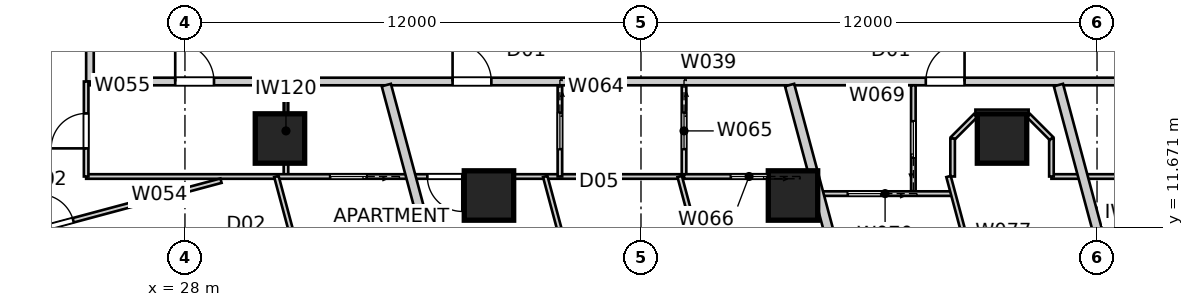
"""IFC4 building model, lengths in metres.
Left out: names, types, materials, properties, quantities, classifications, styles, units other than length and angle.
Written with IfcOpenShell. Run it as: python <this file> out.ifc"""

import sys

from ifc_helpers import new_model, si_unit, direction, frame, frame_2d, origin, origin_2d, place, context, subcontext, project, spatial, rectangle, extrude, element, fill, save


model = new_model("IFC4")
c1 = context("Model", 3, precision=1e-05, world=origin(), true_north=direction((0.0, 1.0)))
c2 = subcontext(c1, "Body", "Model", "MODEL_VIEW")
j1 = project(units=[si_unit("LENGTHUNIT", "METRE"), si_unit("PLANEANGLEUNIT", "RADIAN")], contexts=[c1])
p1 = place(None, origin())
s1 = spatial("IfcSite", under=j1, at=p1, CompositionType="ELEMENT")
p2 = place(p1, origin())
s2 = spatial("IfcBuilding", under=s1, at=p2, CompositionType="ELEMENT")
p3 = place(p2, frame((0.0, 0.0, 125.2)))
s3 = spatial("IfcBuildingStorey", under=s2, at=p3, CompositionType="ELEMENT", Elevation=125.2)
for number, where, z_axis, x_axis in (
    (1, (30.5, 14.0, 0.0), (0.0, 0.0, 1.0), (1.0, 0.0, 0.0)),
    (2, (36.0, 12.5, 0.0), (0.0, 0.0, 1.0), (1.0, 0.0, 0.0)),
    (3, (44.0, 12.5, 0.0), (0.0, 0.0, 1.0), (1.0, 0.0, 0.0)),
    (4, (49.5, 14.0, 0.0), (0.0, 0.0, 1.0), (1.0, 0.0, 0.0)),
):
    element("IfcColumn", number, at=place(p3, frame(where, z_axis=z_axis, x_axis=x_axis)), inside=s3, PredefinedType="COLUMN", context=c2, shape_type="SweptSolid", body=[
        extrude(rectangle(XDim=1.3, YDim=1.3, at=origin_2d()), origin(), (0.0, 0.0, 1.0), 3.4),
    ])
p4 = place(p3, frame((25.5, 15.5, 0.0), z_axis=(0.0, 0.0, 1.0), x_axis=(1.0, 0.0, 0.0)))
e5 = element("IfcWall", 5, at=p4, inside=s3, PredefinedType="PARTITIONING", context=c2, shape_type="SweptSolid", body=[
    extrude(rectangle(XDim=28.2, YDim=0.2, at=frame_2d((14.1, 0.0))), origin(), (0.0, 0.0, 1.0), 3.25),
])
p5 = place(p4, frame((2.244, 0.0, 0.0)))
e6 = element("IfcOpeningElement", 6, at=p5, cuts=e5, PredefinedType="OPENING", context=c2, shape_type="SweptSolid", body=[
    extrude(rectangle(XDim=1.02, YDim=2.1, at=frame_2d((0.51, 1.05))), frame((0.0, 0.11, 0.0), z_axis=(0.0, -1.0, 0.0), x_axis=(1.0, 0.0, 0.0)), (0.0, 0.0, 1.0), 0.22),
])
p6 = place(p4, frame((9.542, 0.0, 0.0)))
e7 = element("IfcOpeningElement", 7, at=p6, cuts=e5, PredefinedType="OPENING", context=c2, shape_type="SweptSolid", body=[
    extrude(rectangle(XDim=1.02, YDim=2.34, at=frame_2d((0.51, 1.17))), frame((0.0, 0.11, 0.0), z_axis=(0.0, -1.0, 0.0), x_axis=(1.0, 0.0, 0.0)), (0.0, 0.0, 1.0), 0.22),
])
p7 = place(p4, frame((21.994, 0.0, 0.0)))
e8 = element("IfcOpeningElement", 8, at=p7, cuts=e5, PredefinedType="OPENING", context=c2, shape_type="SweptSolid", body=[
    extrude(rectangle(XDim=1.02, YDim=2.34, at=frame_2d((0.51, 1.17))), frame((0.0, 0.11, 0.0), z_axis=(0.0, -1.0, 0.0), x_axis=(1.0, 0.0, 0.0)), (0.0, 0.0, 1.0), 0.22),
])
p8 = place(p3, frame((25.5, 43.7, 0.0), z_axis=(0.0, 0.0, 1.0), x_axis=(0.0, -1.0, 0.0)))
e9 = element("IfcWall", 9, at=p8, inside=s3, PredefinedType="PARTITIONING", context=c2, shape_type="SweptSolid", body=[
    extrude(rectangle(XDim=28.2, YDim=0.2, at=frame_2d((14.1, 0.0))), origin(), (0.0, 0.0, 1.0), 3.25),
])
p9 = place(p8, frame((8.742, 0.0, 0.0)))
e10 = element("IfcOpeningElement", 10, at=p9, cuts=e9, PredefinedType="OPENING", context=c2, shape_type="SweptSolid", body=[
    extrude(rectangle(XDim=1.02, YDim=2.34, at=frame_2d((0.51, 1.17))), frame((0.0, 0.11, 0.0), z_axis=(0.0, -1.0, 0.0), x_axis=(1.0, 0.0, 0.0)), (0.0, 0.0, 1.0), 0.22),
])
p10 = place(p8, frame((1.808, 0.0, 0.0)))
e11 = element("IfcOpeningElement", 11, at=p10, cuts=e9, PredefinedType="OPENING", context=c2, shape_type="SweptSolid", body=[
    extrude(rectangle(XDim=1.02, YDim=2.1, at=frame_2d((0.51, 1.05))), frame((0.0, 0.11, 0.0), z_axis=(0.0, -1.0, 0.0), x_axis=(1.0, 0.0, 0.0)), (0.0, 0.0, 1.0), 0.22),
])
p11 = place(p3, frame((36.44, 3.682, 0.0), z_axis=(0.0, 0.0, 1.0), x_axis=(-0.258824223352, 0.965924438766, 0.0)))
e12 = element("IfcWall", 12, at=p11, inside=s3, PredefinedType="PARTITIONING", context=c2, shape_type="SweptSolid", body=[
    extrude(rectangle(XDim=12.138, YDim=0.25, at=frame_2d((6.069, 0.0))), origin(), (0.0, 0.0, 1.0), 3.25),
])
p12 = place(p3, frame((46.341, 6.335, 0.0), z_axis=(0.0, 0.0, 1.0), x_axis=(-0.258814481793, 0.965927049013, 0.0)))
e13 = element("IfcWall", 13, at=p12, inside=s3, PredefinedType="PARTITIONING", context=c2, shape_type="SweptSolid", body=[
    extrude(rectangle(XDim=9.392, YDim=0.25, at=frame_2d((4.696, 0.0))), origin(), (0.0, 0.0, 1.0), 3.25),
])
p13 = place(p3, frame((52.942, 8.104, 0.0), z_axis=(0.0, 0.0, 1.0), x_axis=(-0.258822171171, 0.965924988656, 0.0)))
e14 = element("IfcWall", 14, at=p13, inside=s3, PredefinedType="PARTITIONING", context=c2, shape_type="SweptSolid", body=[
    extrude(rectangle(XDim=7.56, YDim=0.25, at=frame_2d((3.78, 0.0))), origin(), (0.0, 0.0, 1.0), 3.25),
])
p14 = place(p3, frame((30.658, 15.4, 0.0), z_axis=(0.0, 0.0, 1.0), x_axis=(0.0, -1.0, 0.0)))
e15 = element("IfcWall", 15, at=p14, inside=s3, PredefinedType="PARTITIONING", context=c2, shape_type="SweptSolid", body=[
    extrude(rectangle(XDim=2.4, YDim=0.12, at=frame_2d((1.2, 0.0))), origin(), (0.0, 0.0, 1.0), 3.25),
])
p15 = place(p3, frame((41.07, 13.0, 0.0), z_axis=(0.0, 0.0, 1.0), x_axis=(-1.0, 0.0, 0.0)))
e16 = element("IfcWall", 16, at=p15, inside=s3, PredefinedType="PARTITIONING", context=c2, shape_type="SweptSolid", body=[
    extrude(rectangle(XDim=15.67, YDim=0.12, at=frame_2d((7.835, 0.0))), origin(), (0.0, 0.0, 1.0), 2.55),
])
p16 = place(p15, frame((5.772, 0.0, 0.0)))
e17 = element("IfcOpeningElement", 17, at=p16, cuts=e16, PredefinedType="OPENING", context=c2, shape_type="SweptSolid", body=[
    extrude(rectangle(XDim=0.92, YDim=2.34, at=frame_2d((0.46, 1.17))), frame((0.0, 0.07, 0.0), z_axis=(0.0, -1.0, 0.0), x_axis=(1.0, 0.0, 0.0)), (0.0, 0.0, 1.0), 0.14),
])
p17 = place(p15, frame((8.289, 0.0, 0.0)))
e18 = element("IfcOpeningElement", 18, at=p17, cuts=e16, PredefinedType="OPENING", context=c2, shape_type="SweptSolid", body=[
    extrude(rectangle(XDim=0.96, YDim=2.1, at=frame_2d((0.48, 1.05))), frame((0.0, 0.07, 0.0), z_axis=(0.0, -1.0, 0.0), x_axis=(1.0, 0.0, 0.0)), (0.0, 0.0, 1.0), 0.14),
])
p18 = place(p3, frame((25.4, 13.0, 0.0), z_axis=(0.0, 0.0, 1.0), x_axis=(0.0, 1.0, 0.0)))
e19 = element("IfcWall", 19, at=p18, inside=s3, PredefinedType="PARTITIONING", context=c2, shape_type="SweptSolid", body=[
    extrude(rectangle(XDim=2.5, YDim=0.12, at=frame_2d((1.25, 0.0))), origin(), (0.0, 0.0, 1.0), 3.25),
])
p19 = place(p18, frame((0.74, 0.0, 0.0)))
e20 = element("IfcOpeningElement", 20, at=p19, cuts=e19, PredefinedType="OPENING", context=c2, shape_type="SweptSolid", body=[
    extrude(rectangle(XDim=0.92, YDim=2.34, at=frame_2d((0.46, 1.17))), frame((0.0, 0.07, 0.0), z_axis=(0.0, -1.0, 0.0), x_axis=(1.0, 0.0, 0.0)), (0.0, 0.0, 1.0), 0.14),
])
p20 = place(p3, frame((30.406, 13.0, 0.0), z_axis=(0.0, 0.0, 1.0), x_axis=(0.258819200315, -0.9659257847, 0.0)))
e21 = element("IfcWall", 21, at=p20, inside=s3, PredefinedType="PARTITIONING", context=c2, shape_type="SweptSolid", body=[
    extrude(rectangle(XDim=10.522, YDim=0.12, at=frame_2d((5.261, 0.0))), origin(), (0.0, 0.0, 1.0), 2.722),
])
p21 = place(p20, frame((1.846, 0.0, 0.0)))
e22 = element("IfcOpeningElement", 22, at=p21, cuts=e21, PredefinedType="OPENING", context=c2, shape_type="SweptSolid", body=[
    extrude(rectangle(XDim=0.92, YDim=2.34, at=frame_2d((0.46, 1.17))), frame((0.0, 0.07, 0.0), z_axis=(0.0, -1.0, 0.0), x_axis=(1.0, 0.0, 0.0)), (0.0, 0.0, 1.0), 0.14),
])
p22 = place(p3, frame((19.911, 10.468, 0.0), z_axis=(0.0, 0.0, 1.0), x_axis=(0.965927203676, 0.25881390457, 0.0)))
e23 = element("IfcWall", 23, at=p22, inside=s3, PredefinedType="PARTITIONING", context=c2, shape_type="SweptSolid", body=[
    extrude(rectangle(XDim=9.357, YDim=0.12, at=frame_2d((4.678, 0.0))), origin(), (0.0, 0.0, 1.0), 2.638),
])
p23 = place(p22, frame((4.411, 0.0, 0.0)))
e24 = element("IfcOpeningElement", 24, at=p23, cuts=e23, PredefinedType="OPENING", context=c2, shape_type="SweptSolid", body=[
    extrude(rectangle(XDim=0.92, YDim=2.34, at=frame_2d((0.46, 1.17))), frame((0.0, 0.07, 0.0), z_axis=(0.0, -1.0, 0.0), x_axis=(1.0, 0.0, 0.0)), (0.0, 0.0, 1.0), 0.14),
])
p24 = place(p3, frame((37.866, 15.4, 0.0), z_axis=(0.0, 0.0, 1.0), x_axis=(0.0, -1.0, 0.0)))
e25 = element("IfcWall", 25, at=p24, inside=s3, PredefinedType="PARTITIONING", context=c2, shape_type="SweptSolid", body=[
    extrude(rectangle(XDim=2.4, YDim=0.12, at=frame_2d((1.2, 0.0))), origin(), (0.0, 0.0, 1.0), 3.25),
])
p25 = place(p24, frame((0.72, 0.0, 0.0)))
e26 = element("IfcOpeningElement", 26, at=p25, cuts=e25, PredefinedType="OPENING", context=c2, shape_type="SweptSolid", body=[
    extrude(rectangle(XDim=0.96, YDim=2.1, at=frame_2d((0.48, 1.05))), frame((0.0, 0.07, 0.0), z_axis=(0.0, -1.0, 0.0), x_axis=(1.0, 0.0, 0.0)), (0.0, 0.0, 1.0), 0.14),
])
p26 = place(p3, frame((41.132, 15.4, 0.0), z_axis=(0.0, 0.0, 1.0), x_axis=(0.0, -1.0, 0.0)))
e27 = element("IfcWall", 27, at=p26, inside=s3, PredefinedType="PARTITIONING", context=c2, shape_type="SweptSolid", body=[
    extrude(rectangle(XDim=2.4, YDim=0.12, at=frame_2d((1.2, 0.0))), origin(), (0.0, 0.0, 1.0), 3.25),
])
p27 = place(p26, frame((0.72, 0.0, 0.0)))
e28 = element("IfcOpeningElement", 28, at=p27, cuts=e27, PredefinedType="OPENING", context=c2, shape_type="SweptSolid", body=[
    extrude(rectangle(XDim=0.96, YDim=2.1, at=frame_2d((0.48, 1.05))), frame((0.0, 0.07, 0.0), z_axis=(0.0, -1.0, 0.0), x_axis=(1.0, 0.0, 0.0)), (0.0, 0.0, 1.0), 0.14),
])
p28 = place(p3, frame((44.555, 13.0, 0.0), z_axis=(0.0, 0.0, 1.0), x_axis=(-1.0, 0.0, 0.0)))
e29 = element("IfcWall", 29, at=p28, inside=s3, PredefinedType="PARTITIONING", context=c2, shape_type="SweptSolid", body=[
    extrude(rectangle(XDim=3.423, YDim=0.12, at=frame_2d((1.711, 0.0))), origin(), (0.0, 0.0, 1.0), 3.25),
])
p29 = place(p28, frame((1.231, 0.0, 0.0)))
e30 = element("IfcOpeningElement", 30, at=p29, cuts=e29, PredefinedType="OPENING", context=c2, shape_type="SweptSolid", body=[
    extrude(rectangle(XDim=0.96, YDim=2.1, at=frame_2d((0.48, 1.05))), frame((0.0, 0.07, 0.0), z_axis=(0.0, -1.0, 0.0), x_axis=(1.0, 0.0, 0.0)), (0.0, 0.0, 1.0), 0.14),
])
p30 = place(p3, frame((37.481, 13.0, 0.0), z_axis=(0.0, 0.0, 1.0), x_axis=(0.258819860698, -0.965925607751, 0.0)))
e31 = element("IfcWall", 31, at=p30, inside=s3, PredefinedType="PARTITIONING", context=c2, shape_type="SweptSolid", body=[
    extrude(rectangle(XDim=8.691, YDim=0.12, at=frame_2d((4.346, 0.0))), origin(), (0.0, 0.0, 1.0), 3.25),
])
p31 = place(p30, frame((3.906, 0.0, 0.0)))
e32 = element("IfcOpeningElement", 32, at=p31, cuts=e31, PredefinedType="OPENING", context=c2, shape_type="SweptSolid", body=[
    extrude(rectangle(XDim=0.92, YDim=2.34, at=frame_2d((0.46, 1.17))), frame((0.0, 0.07, 0.0), z_axis=(0.0, -1.0, 0.0), x_axis=(1.0, 0.0, 0.0)), (0.0, 0.0, 1.0), 0.14),
])
p32 = place(p3, frame((41.018, 13.0, 0.0), z_axis=(0.0, 0.0, 1.0), x_axis=(0.258813509689, -0.965927309482, 0.0)))
e33 = element("IfcWall", 33, at=p32, inside=s3, PredefinedType="PARTITIONING", context=c2, shape_type="SweptSolid", body=[
    extrude(rectangle(XDim=7.776, YDim=0.12, at=frame_2d((3.888, 0.0))), origin(), (0.0, 0.0, 1.0), 3.25),
])
p33 = place(p3, frame((47.167, 12.55, 0.0), z_axis=(0.0, 0.0, 1.0), x_axis=(0.0, 1.0, 0.0)))
e34 = element("IfcWall", 34, at=p33, inside=s3, PredefinedType="PARTITIONING", context=c2, shape_type="SweptSolid", body=[
    extrude(rectangle(XDim=2.85, YDim=0.12, at=frame_2d((1.425, 0.0))), origin(), (0.0, 0.0, 1.0), 3.25),
])
p34 = place(p33, frame((0.945, 0.0, 0.0)))
e35 = element("IfcOpeningElement", 35, at=p34, cuts=e34, PredefinedType="OPENING", context=c2, shape_type="SweptSolid", body=[
    extrude(rectangle(XDim=0.96, YDim=2.1, at=frame_2d((0.48, 1.05))), frame((0.0, 0.07, 0.0), z_axis=(0.0, -1.0, 0.0), x_axis=(1.0, 0.0, 0.0)), (0.0, 0.0, 1.0), 0.14),
])
p35 = place(p3, frame((48.171, 12.55, 0.0), z_axis=(0.0, 0.0, 1.0), x_axis=(-1.0, 0.0, 0.0)))
e36 = element("IfcWall", 36, at=p35, inside=s3, PredefinedType="PARTITIONING", context=c2, shape_type="SweptSolid", body=[
    extrude(rectangle(XDim=3.495, YDim=0.12, at=frame_2d((1.748, 0.0))), origin(), (0.0, 0.0, 1.0), 3.25),
])
p36 = place(p35, frame((1.77, 0.0, 0.0)))
e37 = element("IfcOpeningElement", 37, at=p36, cuts=e36, PredefinedType="OPENING", context=c2, shape_type="SweptSolid", body=[
    extrude(rectangle(XDim=0.96, YDim=2.1, at=frame_2d((0.48, 1.05))), frame((0.0, 0.07, 0.0), z_axis=(0.0, -1.0, 0.0), x_axis=(1.0, 0.0, 0.0)), (0.0, 0.0, 1.0), 0.14),
])
p37 = place(p3, frame((56.2, 13.0, 0.0), z_axis=(0.0, 0.0, 1.0), x_axis=(-1.0, 0.0, 0.0)))
e38 = element("IfcWall", 38, at=p37, inside=s3, PredefinedType="PARTITIONING", context=c2, shape_type="SweptSolid", body=[
    extrude(rectangle(XDim=5.4, YDim=0.12, at=frame_2d((2.7, 0.0))), origin(), (0.0, 0.0, 1.0), 3.25),
])
p38 = place(p3, frame((50.8, 13.0, 0.0), z_axis=(0.0, 0.0, 1.0), x_axis=(0.0, 1.0, 0.0)))
e39 = element("IfcWall", 39, at=p38, inside=s3, PredefinedType="PARTITIONING", context=c2, shape_type="SweptSolid", body=[
    extrude(rectangle(XDim=1.0, YDim=0.12, at=frame_2d((0.5, 0.0))), origin(), (0.0, 0.0, 1.0), 3.25),
])
p39 = place(p3, frame((50.8, 14.0, 0.0), z_axis=(0.0, 0.0, 1.0), x_axis=(-0.707106781187, 0.707106781187, 0.0)))
e40 = element("IfcWall", 40, at=p39, inside=s3, PredefinedType="PARTITIONING", context=c2, shape_type="SweptSolid", body=[
    extrude(rectangle(XDim=0.849, YDim=0.12, at=frame_2d((0.424, 0.0))), origin(), (0.0, 0.0, 1.0), 3.25),
])
p40 = place(p3, frame((50.2, 14.7, 0.0), z_axis=(0.0, 0.0, 1.0), x_axis=(-1.0, 0.0, 0.0)))
e41 = element("IfcWall", 41, at=p40, inside=s3, PredefinedType="PARTITIONING", context=c2, shape_type="SweptSolid", body=[
    extrude(rectangle(XDim=1.4, YDim=0.12, at=frame_2d((0.7, 0.0))), origin(), (0.0, 0.0, 1.0), 3.25),
])
p41 = place(p3, frame((48.8, 14.6, 0.0), z_axis=(0.0, 0.0, 1.0), x_axis=(-0.707106781187, -0.707106781187, 0.0)))
e42 = element("IfcWall", 42, at=p41, inside=s3, PredefinedType="PARTITIONING", context=c2, shape_type="SweptSolid", body=[
    extrude(rectangle(XDim=0.849, YDim=0.12, at=frame_2d((0.424, 0.0))), origin(), (0.0, 0.0, 1.0), 3.25),
])
p42 = place(p3, frame((48.2, 14.0, 0.0), z_axis=(0.0, 0.0, 1.0), x_axis=(0.0, -1.0, 0.0)))
e43 = element("IfcWall", 43, at=p42, inside=s3, PredefinedType="PARTITIONING", context=c2, shape_type="SweptSolid", body=[
    extrude(rectangle(XDim=1.0, YDim=0.12, at=frame_2d((0.5, 0.0))), origin(), (0.0, 0.0, 1.0), 3.25),
])
p43 = place(p3, frame((48.092, 13.0, 0.0), z_axis=(0.0, 0.0, 1.0), x_axis=(0.258812722515, -0.965927520399, 0.0)))
e44 = element("IfcWall", 44, at=p43, inside=s3, PredefinedType="PARTITIONING", context=c2, shape_type="SweptSolid", body=[
    extrude(rectangle(XDim=5.945, YDim=0.12, at=frame_2d((2.972, 0.0))), origin(), (0.0, 0.0, 1.0), 3.25),
])
p44 = place(p43, frame((2.532, 0.0, 0.0)))
e45 = element("IfcOpeningElement", 45, at=p44, cuts=e44, PredefinedType="OPENING", context=c2, shape_type="SweptSolid", body=[
    extrude(rectangle(XDim=0.92, YDim=2.34, at=frame_2d((0.46, 1.17))), frame((0.0, 0.07, 0.0), z_axis=(0.0, -1.0, 0.0), x_axis=(1.0, 0.0, 0.0)), (0.0, 0.0, 1.0), 0.14),
])
p45 = place(p5, origin())
e46 = element("IfcDoor", 46, at=p45, inside=s3, OperationType="SINGLE_SWING_LEFT", PredefinedType="DOOR", context=c2, shape_type="SweptSolid", body=[
    extrude(rectangle(XDim=1.02, YDim=2.1, at=frame_2d((0.51, 1.05))), frame((0.0, 0.025, 0.0), z_axis=(0.0, -1.0, 0.0), x_axis=(1.0, 0.0, 0.0)), (0.0, 0.0, 1.0), 0.05),
])
fill(e6, e46)
p46 = place(p6, origin())
e47 = element("IfcDoor", 47, at=p46, inside=s3, OperationType="SINGLE_SWING_LEFT", PredefinedType="DOOR", context=c2, shape_type="SweptSolid", body=[
    extrude(rectangle(XDim=1.02, YDim=2.34, at=frame_2d((0.51, 1.17))), frame((0.0, 0.025, 0.0), z_axis=(0.0, -1.0, 0.0), x_axis=(1.0, 0.0, 0.0)), (0.0, 0.0, 1.0), 0.05),
])
fill(e7, e47)
p47 = place(p7, origin())
e48 = element("IfcDoor", 48, at=p47, inside=s3, OperationType="SINGLE_SWING_RIGHT", PredefinedType="DOOR", context=c2, shape_type="SweptSolid", body=[
    extrude(rectangle(XDim=1.02, YDim=2.34, at=frame_2d((0.51, 1.17))), frame((0.0, 0.025, 0.0), z_axis=(0.0, -1.0, 0.0), x_axis=(1.0, 0.0, 0.0)), (0.0, 0.0, 1.0), 0.05),
])
fill(e8, e48)
p48 = place(p19, origin())
e49 = element("IfcDoor", 49, at=p48, inside=s3, OperationType="SINGLE_SWING_LEFT", PredefinedType="DOOR", context=c2, shape_type="SweptSolid", body=[
    extrude(rectangle(XDim=0.92, YDim=2.34, at=frame_2d((0.46, 1.17))), frame((0.0, 0.025, 0.0), z_axis=(0.0, -1.0, 0.0), x_axis=(1.0, 0.0, 0.0)), (0.0, 0.0, 1.0), 0.05),
])
fill(e20, e49)
p49 = place(p16, origin())
e50 = element("IfcDoor", 50, at=p49, inside=s3, OperationType="SINGLE_SWING_LEFT", PredefinedType="DOOR", context=c2, shape_type="SweptSolid", body=[
    extrude(rectangle(XDim=0.92, YDim=2.34, at=frame_2d((0.46, 1.17))), frame((0.0, 0.025, 0.0), z_axis=(0.0, -1.0, 0.0), x_axis=(1.0, 0.0, 0.0)), (0.0, 0.0, 1.0), 0.05),
])
fill(e17, e50)
p50 = place(p25, origin())
e51 = element("IfcDoor", 51, at=p50, inside=s3, OperationType="SLIDING_TO_LEFT", PredefinedType="DOOR", context=c2, shape_type="SweptSolid", body=[
    extrude(rectangle(XDim=0.96, YDim=2.1, at=frame_2d((0.48, 1.05))), frame((0.0, 0.025, 0.0), z_axis=(0.0, -1.0, 0.0), x_axis=(1.0, 0.0, 0.0)), (0.0, 0.0, 1.0), 0.05),
])
fill(e26, e51)
p51 = place(p34, origin())
e52 = element("IfcDoor", 52, at=p51, inside=s3, OperationType="SLIDING_TO_LEFT", PredefinedType="DOOR", context=c2, shape_type="SweptSolid", body=[
    extrude(rectangle(XDim=0.96, YDim=2.1, at=frame_2d((0.48, 1.05))), frame((0.0, 0.025, 0.0), z_axis=(0.0, -1.0, 0.0), x_axis=(1.0, 0.0, 0.0)), (0.0, 0.0, 1.0), 0.05),
])
fill(e35, e52)
p52 = place(p23, origin())
e53 = element("IfcDoor", 53, at=p52, inside=s3, OperationType="SINGLE_SWING_LEFT", PredefinedType="DOOR", context=c2, shape_type="SweptSolid", body=[
    extrude(rectangle(XDim=0.92, YDim=2.34, at=frame_2d((0.46, 1.17))), frame((0.0, 0.025, 0.0), z_axis=(0.0, -1.0, 0.0), x_axis=(1.0, 0.0, 0.0)), (0.0, 0.0, 1.0), 0.05),
])
fill(e24, e53)
p53 = place(p27, origin())
e54 = element("IfcDoor", 54, at=p53, inside=s3, OperationType="SLIDING_TO_LEFT", PredefinedType="DOOR", context=c2, shape_type="SweptSolid", body=[
    extrude(rectangle(XDim=0.96, YDim=2.1, at=frame_2d((0.48, 1.05))), frame((0.0, 0.025, 0.0), z_axis=(0.0, -1.0, 0.0), x_axis=(1.0, 0.0, 0.0)), (0.0, 0.0, 1.0), 0.05),
])
fill(e28, e54)
p54 = place(p36, origin())
e55 = element("IfcDoor", 55, at=p54, inside=s3, OperationType="SLIDING_TO_LEFT", PredefinedType="DOOR", context=c2, shape_type="SweptSolid", body=[
    extrude(rectangle(XDim=0.96, YDim=2.1, at=frame_2d((0.48, 1.05))), frame((0.0, 0.025, 0.0), z_axis=(0.0, -1.0, 0.0), x_axis=(1.0, 0.0, 0.0)), (0.0, 0.0, 1.0), 0.05),
])
fill(e37, e55)
p55 = place(p29, origin())
e56 = element("IfcDoor", 56, at=p55, inside=s3, OperationType="SLIDING_TO_LEFT", PredefinedType="DOOR", context=c2, shape_type="SweptSolid", body=[
    extrude(rectangle(XDim=0.96, YDim=2.1, at=frame_2d((0.48, 1.05))), frame((0.0, 0.025, 0.0), z_axis=(0.0, -1.0, 0.0), x_axis=(1.0, 0.0, 0.0)), (0.0, 0.0, 1.0), 0.05),
])
fill(e30, e56)
p56 = place(p17, origin())
e57 = element("IfcDoor", 57, at=p56, inside=s3, OperationType="SLIDING_TO_LEFT", PredefinedType="DOOR", context=c2, shape_type="SweptSolid", body=[
    extrude(rectangle(XDim=0.96, YDim=2.1, at=frame_2d((0.48, 1.05))), frame((0.0, 0.025, 0.0), z_axis=(0.0, -1.0, 0.0), x_axis=(1.0, 0.0, 0.0)), (0.0, 0.0, 1.0), 0.05),
])
fill(e18, e57)
save(model, sys.argv[1])
